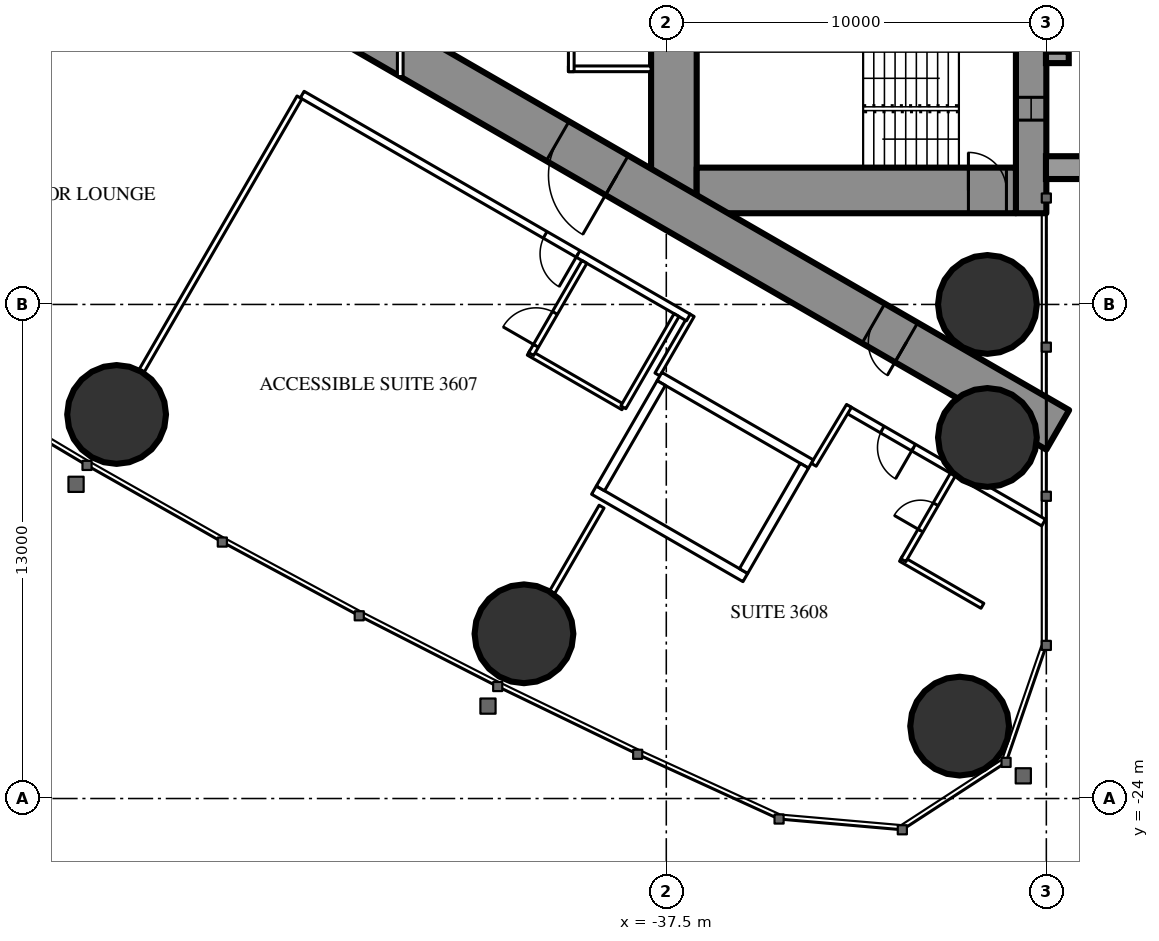
"""IFC4 building model, lengths in metres.
Left out: names, types, materials, properties, quantities, classifications, styles, units other than length and angle.
Written with IfcOpenShell. Run it as: python <this file> out.ifc"""

import sys

from ifc_helpers import new_model, si_unit, direction, frame, frame_2d, origin, origin_2d, place, context, subcontext, project, spatial, rectangle, hollow_circle, extrude, element, fill, save


model = new_model("IFC4")
c1 = context("Model", 3, precision=1e-05, world=origin(), true_north=direction((0.0, 1.0)))
c2 = subcontext(c1, "Body", "Model", "MODEL_VIEW")
j1 = project(units=[si_unit("LENGTHUNIT", "METRE"), si_unit("PLANEANGLEUNIT", "RADIAN")], contexts=[c1])
p1 = place(None, origin())
s1 = spatial("IfcSite", under=j1, at=p1, CompositionType="ELEMENT")
p2 = place(p1, origin())
s2 = spatial("IfcBuilding", under=s1, at=p2, CompositionType="ELEMENT")
p3 = place(p2, frame((0.0, 0.0, 136.1)))
s3 = spatial("IfcBuildingStorey", under=s2, at=p3, CompositionType="ELEMENT", Elevation=136.1)
for number, where, z_axis, x_axis in (
    (1, (-29.781, -22.095, 0.0), (0.0, 0.0, 1.0), (1.0, 0.0, 0.0)),
    (2, (-29.05, -11.0, 0.0), (0.0, 0.0, 1.0), (1.0, 0.0, 0.0)),
    (3, (-29.05, -14.5, 0.0), (0.0, 0.0, 1.0), (1.0, 0.0, 0.0)),
    (4, (-51.963, -13.895, 0.0), (0.0, 0.0, 1.0), (1.0, 0.0, 0.0)),
    (5, (-41.245, -19.666, 0.0), (0.0, 0.0, 1.0), (1.0, 0.0, 0.0)),
):
    element("IfcColumn", number, at=place(p3, frame(where, z_axis=z_axis, x_axis=x_axis)), inside=s3, PredefinedType="COLUMN", context=c2, shape_type="SweptSolid", body=[
        extrude(hollow_circle(Radius=1.3, WallThickness=0.1, at=origin_2d()), origin(), (0.0, 0.0, 1.0), 3.5),
    ])
p4 = place(p3, frame((-27.9, 8.6, 0.0), z_axis=(0.0, 0.0, 1.0), x_axis=(0.0, -1.0, 0.0)))
e6 = element("IfcWall", 6, at=p4, inside=s3, PredefinedType="SHEAR", context=c2, shape_type="SweptSolid", body=[
    extrude(rectangle(XDim=17.2, YDim=0.8, at=frame_2d((8.6, 0.0))), origin(), (0.0, 0.0, 1.0), 3.5),
])
p5 = place(p4, frame((2.45, 0.0, 0.6)))
e7 = element("IfcOpeningElement", 7, at=p5, cuts=e6, PredefinedType="OPENING", context=c2, shape_type="SweptSolid", body=[
    extrude(rectangle(XDim=0.6, YDim=2.1, at=frame_2d((0.3, 1.05))), frame((0.0, 0.41, 0.0), z_axis=(0.0, -1.0, 0.0), x_axis=(1.0, 0.0, 0.0)), (0.0, 0.0, 1.0), 0.82),
])
p6 = place(p4, frame((14.15, 0.0, 0.6)))
e8 = element("IfcOpeningElement", 8, at=p6, cuts=e6, PredefinedType="OPENING", context=c2, shape_type="SweptSolid", body=[
    extrude(rectangle(XDim=0.6, YDim=2.1, at=frame_2d((0.3, 1.05))), frame((0.0, 0.41, 0.0), z_axis=(0.0, -1.0, 0.0), x_axis=(1.0, 0.0, 0.0)), (0.0, 0.0, 1.0), 0.82),
])
p7 = place(p3, frame((-37.3, 8.6, 0.0), z_axis=(0.0, 0.0, 1.0), x_axis=(0.0, -1.0, 0.0)))
e9 = element("IfcWall", 9, at=p7, inside=s3, PredefinedType="SHEAR", context=c2, shape_type="SweptSolid", body=[
    extrude(rectangle(XDim=17.2, YDim=1.2, at=frame_2d((8.6, 0.0))), origin(), (0.0, 0.0, 1.0), 3.5),
])
p8 = place(p7, frame((7.7, 0.0, 0.0)))
e10 = element("IfcOpeningElement", 10, at=p8, cuts=e9, PredefinedType="OPENING", context=c2, shape_type="SweptSolid", body=[
    extrude(rectangle(XDim=1.8, YDim=2.2, at=frame_2d((0.9, 1.1))), frame((0.0, 0.61, 0.0), z_axis=(0.0, -1.0, 0.0), x_axis=(1.0, 0.0, 0.0)), (0.0, 0.0, 1.0), 1.22),
])
p9 = place(p3, frame((-28.3, -8.0, 0.0), z_axis=(0.0, 0.0, 1.0), x_axis=(-1.0, 0.0, 0.0)))
e11 = element("IfcWall", 11, at=p9, inside=s3, PredefinedType="SHEAR", context=c2, shape_type="SweptSolid", body=[
    extrude(rectangle(XDim=8.4, YDim=1.2, at=frame_2d((4.2, 0.0))), origin(), (0.0, 0.0, 1.0), 3.5),
])
p10 = place(p9, frame((0.25, 0.0, 0.0)))
e12 = element("IfcOpeningElement", 12, at=p10, cuts=e11, PredefinedType="OPENING", context=c2, shape_type="SweptSolid", body=[
    extrude(rectangle(XDim=1.0, YDim=2.2, at=frame_2d((0.5, 1.1))), frame((0.0, 0.61, 0.0), z_axis=(0.0, -1.0, 0.0), x_axis=(1.0, 0.0, 0.0)), (0.0, 0.0, 1.0), 1.22),
])
p11 = place(p3, frame((-27.2, -14.3, 0.0), z_axis=(0.0, 0.0, 1.0), x_axis=(-0.866024021859, 0.500002393557, 0.0)))
e13 = element("IfcWall", 13, at=p11, inside=s3, PredefinedType="SHEAR", context=c2, shape_type="SweptSolid", body=[
    extrude(rectangle(XDim=27.907, YDim=1.2, at=frame_2d((13.954, 0.0))), origin(), (0.0, 0.0, 1.0), 3.5),
])
p12 = place(p11, frame((4.6, 0.0, 0.0)))
e14 = element("IfcOpeningElement", 14, at=p12, cuts=e13, PredefinedType="OPENING", context=c2, shape_type="SweptSolid", body=[
    extrude(rectangle(XDim=1.0, YDim=2.2, at=frame_2d((0.5, 1.1))), frame((0.0, 0.61, 0.0), z_axis=(0.0, -1.0, 0.0), x_axis=(1.0, 0.0, 0.0)), (0.0, 0.0, 1.0), 1.22),
])
p13 = place(p11, frame((13.395, 0.0, 0.0)))
e15 = element("IfcOpeningElement", 15, at=p13, cuts=e13, PredefinedType="OPENING", context=c2, shape_type="SweptSolid", body=[
    extrude(rectangle(XDim=1.8, YDim=2.2, at=frame_2d((0.9, 1.1))), frame((0.0, 0.61, 0.0), z_axis=(0.0, -1.0, 0.0), x_axis=(1.0, 0.0, 0.0)), (0.0, 0.0, 1.0), 1.22),
])
p14 = place(p3, frame((-47.151, -5.552, 0.0), z_axis=(0.0, 0.0, 1.0), x_axis=(-0.500003012045, -0.866023664773, 0.0)))
e16 = element("IfcWall", 16, at=p14, inside=s3, PredefinedType="PARTITIONING", context=c2, shape_type="SweptSolid", body=[
    extrude(rectangle(XDim=8.311, YDim=0.15, at=frame_2d((4.156, 0.0))), origin(), (0.0, 0.0, 1.0), 2.2),
])
p15 = place(p3, frame((-39.202, -16.32, 0.0), z_axis=(0.0, 0.0, 1.0), x_axis=(-0.49997716683, -0.86603858612, 0.0)))
e17 = element("IfcWall", 17, at=p15, inside=s3, PredefinedType="PARTITIONING", context=c2, shape_type="SweptSolid", body=[
    extrude(rectangle(XDim=2.6, YDim=0.15, at=frame_2d((1.3, 0.0))), origin(), (0.0, 0.0, 1.0), 3.25),
])
p16 = place(p3, frame((-27.572, -16.741, 0.0), z_axis=(0.0, 0.0, 1.0), x_axis=(-0.866024464444, 0.500001626982, 0.0)))
e18 = element("IfcWall", 18, at=p16, inside=s3, PredefinedType="PARTITIONING", context=c2, shape_type="SweptSolid", body=[
    extrude(rectangle(XDim=5.955, YDim=0.2, at=frame_2d((2.978, 0.0))), origin(), (0.0, 0.0, 1.0), 3.25),
])
p17 = place(p16, frame((3.95, 0.0, 0.0)))
e19 = element("IfcOpeningElement", 19, at=p17, cuts=e18, PredefinedType="OPENING", context=c2, shape_type="SweptSolid", body=[
    extrude(rectangle(XDim=0.95, YDim=2.2, at=frame_2d((0.475, 1.1))), frame((0.0, 0.11, 0.0), z_axis=(0.0, -1.0, 0.0), x_axis=(1.0, 0.0, 0.0)), (0.0, 0.0, 1.0), 0.22),
])
p18 = place(p3, frame((-36.831, -11.28, 0.0), z_axis=(0.0, 0.0, 1.0), x_axis=(-0.499937177781, -0.866061671171, 0.0)))
e20 = element("IfcWall", 20, at=p18, inside=s3, PredefinedType="PARTITIONING", context=c2, shape_type="SweptSolid", body=[
    extrude(rectangle(XDim=1.804, YDim=0.15, at=frame_2d((0.902, 0.0))), origin(), (0.0, 0.0, 1.0), 3.25),
])
p19 = place(p3, frame((-33.621, -15.218, 0.0), z_axis=(0.0, 0.0, 1.0), x_axis=(0.514336634837, 0.857588377991, 0.0)))
e21 = element("IfcWall", 21, at=p19, inside=s3, PredefinedType="PARTITIONING", context=c2, shape_type="SweptSolid", body=[
    extrude(rectangle(XDim=1.805, YDim=0.15, at=frame_2d((0.903, 0.0))), origin(), (0.0, 0.0, 1.0), 3.25),
])
p20 = place(p3, frame((-36.92, -11.344, 0.0), z_axis=(0.0, 0.0, 1.0), x_axis=(-0.866027897759, 0.499995680284, 0.0)))
e22 = element("IfcWall", 22, at=p20, inside=s3, PredefinedType="PARTITIONING", context=c2, shape_type="SweptSolid", body=[
    extrude(rectangle(XDim=11.731, YDim=0.2, at=frame_2d((5.865, 0.0))), origin(), (0.0, 0.0, 1.0), 3.25),
])
p21 = place(p20, frame((3.35, 0.0, 0.0)))
e23 = element("IfcOpeningElement", 23, at=p21, cuts=e22, PredefinedType="OPENING", context=c2, shape_type="SweptSolid", body=[
    extrude(rectangle(XDim=1.0, YDim=2.2, at=frame_2d((0.5, 1.1))), frame((0.0, 0.11, 0.0), z_axis=(0.0, -1.0, 0.0), x_axis=(1.0, 0.0, 0.0)), (0.0, 0.0, 1.0), 0.22),
])
p22 = place(p3, frame((-38.63, -13.705, 0.0), z_axis=(0.0, 0.0, 1.0), x_axis=(-0.866018712932, 0.500011588718, 0.0)))
e24 = element("IfcWall", 24, at=p22, inside=s3, PredefinedType="PARTITIONING", context=c2, shape_type="SweptSolid", body=[
    extrude(rectangle(XDim=2.875, YDim=0.15, at=frame_2d((1.438, 0.0))), origin(), (0.0, 0.0, 1.0), 3.25),
])
p23 = place(p3, frame((-39.655, -9.88, 0.0), z_axis=(0.0, 0.0, 1.0), x_axis=(-0.500049511043, -0.865996816683, 0.0)))
e25 = element("IfcWall", 25, at=p23, inside=s3, PredefinedType="PARTITIONING", context=c2, shape_type="SweptSolid", body=[
    extrude(rectangle(XDim=2.8, YDim=0.15, at=frame_2d((1.4, 0.0))), origin(), (0.0, 0.0, 1.0), 3.25),
])
p24 = place(p23, frame((1.55, 0.0, 0.0)))
e26 = element("IfcOpeningElement", 26, at=p24, cuts=e25, PredefinedType="OPENING", context=c2, shape_type="SweptSolid", body=[
    extrude(rectangle(XDim=1.0, YDim=2.2, at=frame_2d((0.5, 1.1))), frame((0.0, 0.085, 0.0), z_axis=(0.0, -1.0, 0.0), x_axis=(1.0, 0.0, 0.0)), (0.0, 0.0, 1.0), 0.17),
])
p25 = place(p3, frame((-37.23, -11.281, 0.0), z_axis=(0.0, 0.0, 1.0), x_axis=(-0.500049511043, -0.865996816683, 0.0)))
e27 = element("IfcWall", 27, at=p25, inside=s3, PredefinedType="PARTITIONING", context=c2, shape_type="SweptSolid", body=[
    extrude(rectangle(XDim=2.8, YDim=0.15, at=frame_2d((1.4, 0.0))), origin(), (0.0, 0.0, 1.0), 3.25),
])
p26 = place(p3, frame((-29.182, -18.929, 0.0), z_axis=(0.0, 0.0, 1.0), x_axis=(-0.866006523861, 0.500032699561, 0.0)))
e28 = element("IfcWall", 28, at=p26, inside=s3, PredefinedType="PARTITIONING", context=c2, shape_type="SweptSolid", body=[
    extrude(rectangle(XDim=2.475, YDim=0.15, at=frame_2d((1.237, 0.0))), origin(), (0.0, 0.0, 1.0), 3.25),
])
p27 = place(p3, frame((-29.96, -15.478, 0.0), z_axis=(0.0, 0.0, 1.0), x_axis=(-0.500006934395, -0.866021400173, 0.0)))
e29 = element("IfcWall", 29, at=p27, inside=s3, PredefinedType="PARTITIONING", context=c2, shape_type="SweptSolid", body=[
    extrude(rectangle(XDim=2.6, YDim=0.15, at=frame_2d((1.3, 0.0))), origin(), (0.0, 0.0, 1.0), 3.25),
])
p28 = place(p27, frame((0.9, 0.0, 0.0)))
e30 = element("IfcOpeningElement", 30, at=p28, cuts=e29, PredefinedType="OPENING", context=c2, shape_type="SweptSolid", body=[
    extrude(rectangle(XDim=0.8, YDim=2.2, at=frame_2d((0.4, 1.1))), frame((0.0, 0.085, 0.0), z_axis=(0.0, -1.0, 0.0), x_axis=(1.0, 0.0, 0.0)), (0.0, 0.0, 1.0), 0.17),
])
p29 = place(p3, frame((-37.9, -4.8, 0.0), z_axis=(0.0, 0.0, 1.0), x_axis=(-1.0, 0.0, 0.0)))
e31 = element("IfcWall", 31, at=p29, inside=s3, PredefinedType="PARTITIONING", context=c2, shape_type="SweptSolid", body=[
    extrude(rectangle(XDim=2.175, YDim=0.15, at=frame_2d((1.087, 0.0))), origin(), (0.0, 0.0, 1.0), 3.25),
])
p30 = place(p3, frame((-40.0, -1.125, 0.0), z_axis=(0.0, 0.0, 1.0), x_axis=(0.0, -1.0, 0.0)))
e32 = element("IfcWall", 32, at=p30, inside=s3, PredefinedType="PARTITIONING", context=c2, shape_type="SweptSolid", body=[
    extrude(rectangle(XDim=3.75, YDim=0.15, at=frame_2d((1.875, 0.0))), origin(), (0.0, 0.0, 1.0), 3.25),
])
p31 = place(p30, frame((1.375, 0.0, 0.0)))
e33 = element("IfcOpeningElement", 33, at=p31, cuts=e32, PredefinedType="OPENING", context=c2, shape_type="SweptSolid", body=[
    extrude(rectangle(XDim=1.0, YDim=2.2, at=frame_2d((0.5, 1.1))), frame((0.0, 0.085, 0.0), z_axis=(0.0, -1.0, 0.0), x_axis=(1.0, 0.0, 0.0)), (0.0, 0.0, 1.0), 0.17),
])
p32 = place(p3, frame((-44.5, 5.005, 0.0), z_axis=(0.0, 0.0, 1.0), x_axis=(0.0, -1.0, 0.0)))
e34 = element("IfcWall", 34, at=p32, inside=s3, PredefinedType="PARTITIONING", context=c2, shape_type="SweptSolid", body=[
    extrude(rectangle(XDim=10.009, YDim=0.15, at=frame_2d((5.005, 0.0))), origin(), (0.0, 0.0, 1.0), 2.45),
])
p33 = place(p32, frame((4.505, 0.0, 0.0)))
e35 = element("IfcOpeningElement", 35, at=p33, cuts=e34, PredefinedType="OPENING", context=c2, shape_type="SweptSolid", body=[
    extrude(rectangle(XDim=1.0, YDim=2.2, at=frame_2d((0.5, 1.1))), frame((0.0, 0.085, 0.0), z_axis=(0.0, -1.0, 0.0), x_axis=(1.0, 0.0, 0.0)), (0.0, 0.0, 1.0), 0.17),
])
p34 = place(p3, frame((-33.696, -15.197, 0.0), z_axis=(0.0, 0.0, 1.0), x_axis=(-0.865976953817, 0.500083908417, 0.0)))
e36 = element("IfcWall", 36, at=p34, inside=s3, PredefinedType="PARTITIONING", context=c2, shape_type="SweptSolid", body=[
    extrude(rectangle(XDim=4.599, YDim=0.25, at=frame_2d((2.3, 0.0))), origin(), (0.0, 0.0, 1.0), 3.25),
])
p35 = place(p3, frame((-35.42, -18.186, 0.0), z_axis=(0.0, 0.0, 1.0), x_axis=(-0.865990227814, 0.50006092162, 0.0)))
e37 = element("IfcWall", 37, at=p35, inside=s3, PredefinedType="PARTITIONING", context=c2, shape_type="SweptSolid", body=[
    extrude(rectangle(XDim=4.6, YDim=0.25, at=frame_2d((2.3, 0.0))), origin(), (0.0, 0.0, 1.0), 3.25),
])
p36 = place(p3, frame((-33.866, -15.243, 0.0), z_axis=(0.0, 0.0, 1.0), x_axis=(-0.499929347863, -0.866066190972, 0.0)))
e38 = element("IfcWall", 38, at=p36, inside=s3, PredefinedType="PARTITIONING", context=c2, shape_type="SweptSolid", body=[
    extrude(rectangle(XDim=3.201, YDim=0.25, at=frame_2d((1.6, 0.0))), origin(), (0.0, 0.0, 1.0), 3.25),
])
p37 = place(p3, frame((-37.633, -13.068, 0.0), z_axis=(0.0, 0.0, 1.0), x_axis=(-0.499872130319, -0.866099216793, 0.0)))
e39 = element("IfcWall", 39, at=p37, inside=s3, PredefinedType="PARTITIONING", context=c2, shape_type="SweptSolid", body=[
    extrude(rectangle(XDim=3.2, YDim=0.25, at=frame_2d((1.6, 0.0))), origin(), (0.0, 0.0, 1.0), 3.25),
])
p38 = place(p24, origin())
e40 = element("IfcDoor", 40, at=p38, inside=s3, OperationType="SINGLE_SWING_RIGHT", PredefinedType="DOOR", context=c2, shape_type="SweptSolid", body=[
    extrude(rectangle(XDim=1.0, YDim=2.2, at=frame_2d((0.5, 1.1))), frame((0.0, 0.025, 0.0), z_axis=(0.0, -1.0, 0.0), x_axis=(1.0, 0.0, 0.0)), (0.0, 0.0, 1.0), 0.05),
])
fill(e26, e40)
p39 = place(p21, origin())
e41 = element("IfcDoor", 41, at=p39, inside=s3, OperationType="SINGLE_SWING_LEFT", PredefinedType="DOOR", context=c2, shape_type="SweptSolid", body=[
    extrude(rectangle(XDim=1.0, YDim=2.2, at=frame_2d((0.5, 1.1))), frame((0.0, 0.025, 0.0), z_axis=(0.0, -1.0, 0.0), x_axis=(1.0, 0.0, 0.0)), (0.0, 0.0, 1.0), 0.05),
])
fill(e23, e41)
p40 = place(p28, origin())
e42 = element("IfcDoor", 42, at=p40, inside=s3, OperationType="SINGLE_SWING_RIGHT", PredefinedType="DOOR", context=c2, shape_type="SweptSolid", body=[
    extrude(rectangle(XDim=0.8, YDim=2.2, at=frame_2d((0.4, 1.1))), frame((0.0, 0.025, 0.0), z_axis=(0.0, -1.0, 0.0), x_axis=(1.0, 0.0, 0.0)), (0.0, 0.0, 1.0), 0.05),
])
fill(e30, e42)
p41 = place(p17, origin())
e43 = element("IfcDoor", 43, at=p41, inside=s3, OperationType="SINGLE_SWING_LEFT", PredefinedType="DOOR", context=c2, shape_type="SweptSolid", body=[
    extrude(rectangle(XDim=0.95, YDim=2.2, at=frame_2d((0.475, 1.1))), frame((0.0, 0.025, 0.0), z_axis=(0.0, -1.0, 0.0), x_axis=(1.0, 0.0, 0.0)), (0.0, 0.0, 1.0), 0.05),
])
fill(e19, e43)
p42 = place(p12, origin())
e44 = element("IfcDoor", 44, at=p42, inside=s3, OperationType="SINGLE_SWING_LEFT", PredefinedType="DOOR", context=c2, shape_type="SweptSolid", body=[
    extrude(rectangle(XDim=1.0, YDim=2.2, at=frame_2d((0.5, 1.1))), frame((0.0, 0.025, 0.0), z_axis=(0.0, -1.0, 0.0), x_axis=(1.0, 0.0, 0.0)), (0.0, 0.0, 1.0), 0.05),
])
fill(e14, e44)
p43 = place(p13, origin())
e45 = element("IfcDoor", 45, at=p43, inside=s3, OperationType="DOUBLE_DOOR_SINGLE_SWING", PredefinedType="DOOR", context=c2, shape_type="SweptSolid", body=[
    extrude(rectangle(XDim=1.8, YDim=2.2, at=frame_2d((0.9, 1.1))), frame((0.0, 0.025, 0.0), z_axis=(0.0, -1.0, 0.0), x_axis=(1.0, 0.0, 0.0)), (0.0, 0.0, 1.0), 0.05),
])
fill(e15, e45)
p44 = place(p10, origin())
e46 = element("IfcDoor", 46, at=p44, inside=s3, OperationType="SINGLE_SWING_RIGHT", PredefinedType="DOOR", context=c2, shape_type="SweptSolid", body=[
    extrude(rectangle(XDim=1.0, YDim=2.2, at=frame_2d((0.5, 1.1))), frame((0.0, 0.025, 0.0), z_axis=(0.0, -1.0, 0.0), x_axis=(1.0, 0.0, 0.0)), (0.0, 0.0, 1.0), 0.05),
])
fill(e12, e46)
p45 = place(p6, origin())
e47 = element("IfcWindow", 47, at=p45, inside=s3, PartitioningType="SINGLE_PANEL", PredefinedType="WINDOW", context=c2, shape_type="SweptSolid", body=[
    extrude(rectangle(XDim=0.6, YDim=2.1, at=frame_2d((0.3, 1.05))), frame((0.0, 0.03, 0.0), z_axis=(0.0, -1.0, 0.0), x_axis=(1.0, 0.0, 0.0)), (0.0, 0.0, 1.0), 0.06),
])
fill(e8, e47)
save(model, sys.argv[1])
